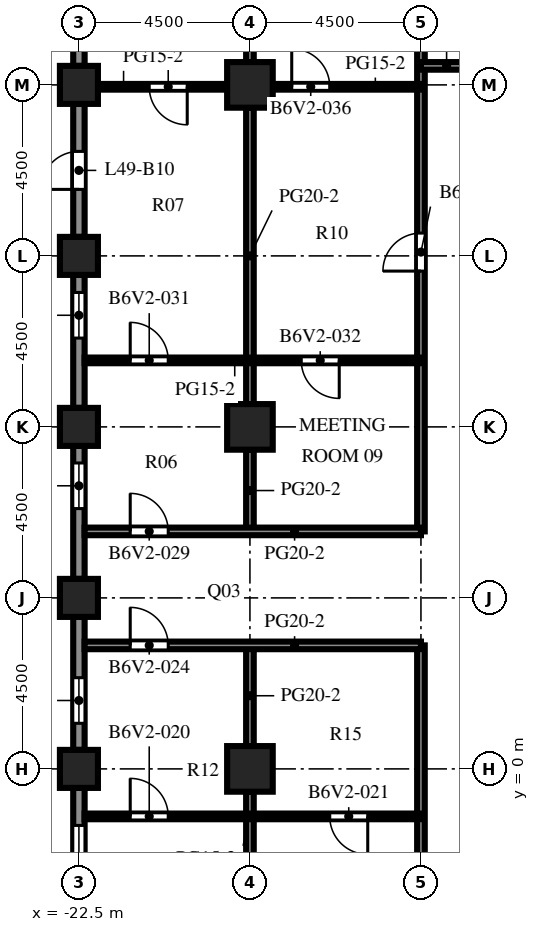
"""IFC4 building model, lengths in metres.
Left out: names, types, materials, properties, quantities, classifications, styles, units other than length and angle.
Written with IfcOpenShell. Run it as: python <this file> out.ifc"""

import sys

from ifc_helpers import new_model, si_unit, direction, frame, frame_2d, origin, origin_2d, place, context, subcontext, project, spatial, rectangle, extrude, element, fill, save


model = new_model("IFC4")
c1 = context("Model", 3, precision=1e-05, world=origin(), true_north=direction((0.0, 1.0)))
c2 = subcontext(c1, "Body", "Model", "MODEL_VIEW")
j1 = project(units=[si_unit("LENGTHUNIT", "METRE"), si_unit("PLANEANGLEUNIT", "RADIAN")], contexts=[c1])
p1 = place(None, origin())
s1 = spatial("IfcSite", under=j1, at=p1, CompositionType="ELEMENT")
p2 = place(p1, origin())
s2 = spatial("IfcBuilding", under=s1, at=p2, CompositionType="ELEMENT")
p3 = place(p2, frame((0.0, 0.0, 216.1)))
s3 = spatial("IfcBuildingStorey", under=s2, at=p3, CompositionType="ELEMENT", Elevation=216.1)
for number, where, z_axis, x_axis in (
    (1, (-22.5, 0.0, 0.0), (0.0, 0.0, 1.0), (1.0, 0.0, 0.0)),
    (2, (-22.5, 4.5, 0.0), (0.0, 0.0, 1.0), (1.0, 0.0, 0.0)),
    (3, (-22.5, 9.0, 0.0), (0.0, 0.0, 1.0), (1.0, 0.0, 0.0)),
    (4, (-22.5, 13.5, 0.0), (0.0, 0.0, 1.0), (1.0, 0.0, 0.0)),
    (5, (-22.5, 18.0, 0.0), (0.0, 0.0, 1.0), (1.0, 0.0, 0.0)),
):
    element("IfcColumn", number, at=place(p3, frame(where, z_axis=z_axis, x_axis=x_axis)), inside=s3, PredefinedType="COLUMN", context=c2, shape_type="SweptSolid", body=[
        extrude(rectangle(XDim=1.0, YDim=1.0, at=origin_2d()), origin(), (0.0, 0.0, 1.0), 4.1),
    ])
for number, where, z_axis, x_axis in (
    (6, (-18.0, 0.0, 0.0), (0.0, 0.0, 1.0), (1.0, 0.0, 0.0)),
    (7, (-18.0, 9.0, 0.0), (0.0, 0.0, 1.0), (1.0, 0.0, 0.0)),
    (8, (-18.0, 18.0, 0.0), (0.0, 0.0, 1.0), (1.0, 0.0, 0.0)),
):
    element("IfcColumn", number, at=place(p3, frame(where, z_axis=z_axis, x_axis=x_axis)), inside=s3, PredefinedType="COLUMN", context=c2, shape_type="SweptSolid", body=[
        extrude(rectangle(XDim=1.2, YDim=1.2, at=origin_2d()), origin(), (0.0, 0.0, 1.0), 4.1),
    ])
p4 = place(p3, frame((-22.5, 18.5, 0.0), z_axis=(0.0, 0.0, 1.0), x_axis=(0.0, 1.0, 0.0)))
e9 = element("IfcWall", 9, at=p4, inside=s3, PredefinedType="SOLIDWALL", context=c2, shape_type="SweptSolid", body=[
    extrude(rectangle(XDim=3.5, YDim=0.3, at=frame_2d((1.75, 0.0))), origin(), (0.0, 0.0, 1.0), 2.7),
])
p5 = place(p4, frame((0.55, 0.0, 0.8)))
e10 = element("IfcOpeningElement", 10, at=p5, cuts=e9, PredefinedType="OPENING", context=c2, shape_type="SweptSolid", body=[
    extrude(rectangle(XDim=2.4, YDim=1.7, at=frame_2d((1.2, 0.85))), frame((0.0, 0.16, 0.0), z_axis=(0.0, -1.0, 0.0), x_axis=(1.0, 0.0, 0.0)), (0.0, 0.0, 1.0), 0.32),
])
p6 = place(p3, frame((-22.5, 14.0, 0.0), z_axis=(0.0, 0.0, 1.0), x_axis=(0.0, 1.0, 0.0)))
e11 = element("IfcWall", 11, at=p6, inside=s3, PredefinedType="SOLIDWALL", context=c2, shape_type="SweptSolid", body=[
    extrude(rectangle(XDim=3.5, YDim=0.3, at=frame_2d((1.75, 0.0))), origin(), (0.0, 0.0, 1.0), 2.7),
])
p7 = place(p6, frame((1.25, 0.0, 0.0)))
e12 = element("IfcOpeningElement", 12, at=p7, cuts=e11, PredefinedType="OPENING", context=c2, shape_type="SweptSolid", body=[
    extrude(rectangle(XDim=1.0, YDim=2.2, at=frame_2d((0.5, 1.1))), frame((0.0, 0.16, 0.0), z_axis=(0.0, -1.0, 0.0), x_axis=(1.0, 0.0, 0.0)), (0.0, 0.0, 1.0), 0.32),
])
p8 = place(p3, frame((-22.5, 9.5, 0.0), z_axis=(0.0, 0.0, 1.0), x_axis=(0.0, 1.0, 0.0)))
e13 = element("IfcWall", 13, at=p8, inside=s3, PredefinedType="SOLIDWALL", context=c2, shape_type="SweptSolid", body=[
    extrude(rectangle(XDim=3.5, YDim=0.3, at=frame_2d((1.75, 0.0))), origin(), (0.0, 0.0, 1.0), 2.7),
])
p9 = place(p8, frame((1.837, 0.0, 0.8)))
e14 = element("IfcOpeningElement", 14, at=p9, cuts=e13, PredefinedType="OPENING", context=c2, shape_type="SweptSolid", body=[
    extrude(rectangle(XDim=1.2, YDim=1.7, at=frame_2d((0.6, 0.85))), frame((0.0, 0.16, 0.0), z_axis=(0.0, -1.0, 0.0), x_axis=(1.0, 0.0, 0.0)), (0.0, 0.0, 1.0), 0.32),
])
p10 = place(p3, frame((-22.5, 5.0, 0.0), z_axis=(0.0, 0.0, 1.0), x_axis=(0.0, 1.0, 0.0)))
e15 = element("IfcWall", 15, at=p10, inside=s3, PredefinedType="SOLIDWALL", context=c2, shape_type="SweptSolid", body=[
    extrude(rectangle(XDim=3.5, YDim=0.3, at=frame_2d((1.75, 0.0))), origin(), (0.0, 0.0, 1.0), 2.7),
])
p11 = place(p10, frame((1.85, 0.0, 0.8)))
e16 = element("IfcOpeningElement", 16, at=p11, cuts=e15, PredefinedType="OPENING", context=c2, shape_type="SweptSolid", body=[
    extrude(rectangle(XDim=1.2, YDim=1.7, at=frame_2d((0.6, 0.85))), frame((0.0, 0.16, 0.0), z_axis=(0.0, -1.0, 0.0), x_axis=(1.0, 0.0, 0.0)), (0.0, 0.0, 1.0), 0.32),
])
p12 = place(p3, frame((-22.5, 0.5, 0.0), z_axis=(0.0, 0.0, 1.0), x_axis=(0.0, 1.0, 0.0)))
e17 = element("IfcWall", 17, at=p12, inside=s3, PredefinedType="SOLIDWALL", context=c2, shape_type="SweptSolid", body=[
    extrude(rectangle(XDim=3.5, YDim=0.3, at=frame_2d((1.75, 0.0))), origin(), (0.0, 0.0, 1.0), 2.7),
])
p13 = place(p12, frame((0.7, 0.0, 0.8)))
e18 = element("IfcOpeningElement", 18, at=p13, cuts=e17, PredefinedType="OPENING", context=c2, shape_type="SweptSolid", body=[
    extrude(rectangle(XDim=1.2, YDim=1.7, at=frame_2d((0.6, 0.85))), frame((0.0, 0.16, 0.0), z_axis=(0.0, -1.0, 0.0), x_axis=(1.0, 0.0, 0.0)), (0.0, 0.0, 1.0), 0.32),
])
p14 = place(p3, frame((-22.5, -4.0, 0.0), z_axis=(0.0, 0.0, 1.0), x_axis=(0.0, 1.0, 0.0)))
e19 = element("IfcWall", 19, at=p14, inside=s3, PredefinedType="SOLIDWALL", context=c2, shape_type="SweptSolid", body=[
    extrude(rectangle(XDim=3.5, YDim=0.3, at=frame_2d((1.75, 0.0))), origin(), (0.0, 0.0, 1.0), 2.7),
])
p15 = place(p14, frame((0.113, 0.0, 0.8)))
e20 = element("IfcOpeningElement", 20, at=p15, cuts=e19, PredefinedType="OPENING", context=c2, shape_type="SweptSolid", body=[
    extrude(rectangle(XDim=2.4, YDim=1.7, at=frame_2d((1.2, 0.85))), frame((0.0, 0.16, 0.0), z_axis=(0.0, -1.0, 0.0), x_axis=(1.0, 0.0, 0.0)), (0.0, 0.0, 1.0), 0.32),
])
p16 = place(p3, frame((-18.0, -8.4, 0.0), z_axis=(0.0, 0.0, 1.0), x_axis=(0.0, 1.0, 0.0)))
e21 = element("IfcWall", 21, at=p16, inside=s3, PredefinedType="PARTITIONING", context=c2, shape_type="SweptSolid", body=[
    extrude(rectangle(XDim=7.8, YDim=0.2, at=frame_2d((3.9, 0.0))), origin(), (0.0, 0.0, 1.0), 3.5),
])
p17 = place(p3, frame((-18.0, 0.6, 0.0), z_axis=(0.0, 0.0, 1.0), x_axis=(0.0, 1.0, 0.0)))
e22 = element("IfcWall", 22, at=p17, inside=s3, PredefinedType="PARTITIONING", context=c2, shape_type="SweptSolid", body=[
    extrude(rectangle(XDim=2.65, YDim=0.2, at=frame_2d((1.325, 0.0))), origin(), (0.0, 0.0, 1.0), 3.5),
])
p18 = place(p3, frame((-18.0, 6.25, 0.0), z_axis=(0.0, 0.0, 1.0), x_axis=(0.0, 1.0, 0.0)))
e23 = element("IfcWall", 23, at=p18, inside=s3, PredefinedType="PARTITIONING", context=c2, shape_type="SweptSolid", body=[
    extrude(rectangle(XDim=2.15, YDim=0.2, at=frame_2d((1.075, 0.0))), origin(), (0.0, 0.0, 1.0), 3.5),
])
p19 = place(p3, frame((-18.0, 9.6, 0.0), z_axis=(0.0, 0.0, 1.0), x_axis=(0.0, 1.0, 0.0)))
e24 = element("IfcWall", 24, at=p19, inside=s3, PredefinedType="PARTITIONING", context=c2, shape_type="SweptSolid", body=[
    extrude(rectangle(XDim=7.8, YDim=0.2, at=frame_2d((3.9, 0.0))), origin(), (0.0, 0.0, 1.0), 3.5),
])
p20 = place(p3, frame((-18.0, 18.6, 0.0), z_axis=(0.0, 0.0, 1.0), x_axis=(0.0, 1.0, 0.0)))
e25 = element("IfcWall", 25, at=p20, inside=s3, PredefinedType="PARTITIONING", context=c2, shape_type="SweptSolid", body=[
    extrude(rectangle(XDim=7.9, YDim=0.2, at=frame_2d((3.95, 0.0))), origin(), (0.0, 0.0, 1.0), 3.5),
])
p21 = place(p3, frame((-13.5, -26.5, 0.0), z_axis=(0.0, 0.0, 1.0), x_axis=(0.0, 1.0, 0.0)))
e26 = element("IfcWall", 26, at=p21, inside=s3, PredefinedType="PARTITIONING", context=c2, shape_type="SweptSolid", body=[
    extrude(rectangle(XDim=29.75, YDim=0.2, at=frame_2d((14.875, 0.0))), origin(), (0.0, 0.0, 1.0), 3.5),
])
p22 = place(p21, frame((20.9, 0.0, 0.0)))
e27 = element("IfcOpeningElement", 27, at=p22, cuts=e26, PredefinedType="OPENING", context=c2, shape_type="SweptSolid", body=[
    extrude(rectangle(XDim=1.0, YDim=2.1, at=frame_2d((0.5, 1.05))), frame((0.0, 0.11, 0.0), z_axis=(0.0, -1.0, 0.0), x_axis=(1.0, 0.0, 0.0)), (0.0, 0.0, 1.0), 0.22),
])
p23 = place(p3, frame((-13.5, 6.25, 0.0), z_axis=(0.0, 0.0, 1.0), x_axis=(0.0, 1.0, 0.0)))
e28 = element("IfcWall", 28, at=p23, inside=s3, PredefinedType="PARTITIONING", context=c2, shape_type="SweptSolid", body=[
    extrude(rectangle(XDim=20.25, YDim=0.2, at=frame_2d((10.125, 0.0))), origin(), (0.0, 0.0, 1.0), 3.5),
])
p24 = place(p23, frame((6.85, 0.0, 0.0)))
e29 = element("IfcOpeningElement", 29, at=p24, cuts=e28, PredefinedType="OPENING", context=c2, shape_type="SweptSolid", body=[
    extrude(rectangle(XDim=1.0, YDim=2.1, at=frame_2d((0.5, 1.05))), frame((0.0, 0.11, 0.0), z_axis=(0.0, -1.0, 0.0), x_axis=(1.0, 0.0, 0.0)), (0.0, 0.0, 1.0), 0.22),
])
p25 = place(p3, frame((-13.5, -1.25, 0.0), z_axis=(0.0, 0.0, 1.0), x_axis=(-1.0, 0.0, 0.0)))
e30 = element("IfcWall", 30, at=p25, inside=s3, PredefinedType="PARTITIONING", context=c2, shape_type="SweptSolid", body=[
    extrude(rectangle(XDim=8.85, YDim=0.15, at=frame_2d((4.425, 0.0))), origin(), (0.0, 0.0, 1.0), 3.5),
])
p26 = place(p25, frame((6.65, 0.0, 0.0)))
e31 = element("IfcOpeningElement", 31, at=p26, cuts=e30, PredefinedType="OPENING", context=c2, shape_type="SweptSolid", body=[
    extrude(rectangle(XDim=1.0, YDim=2.1, at=frame_2d((0.5, 1.05))), frame((0.0, 0.085, 0.0), z_axis=(0.0, -1.0, 0.0), x_axis=(1.0, 0.0, 0.0)), (0.0, 0.0, 1.0), 0.17),
])
p27 = place(p25, frame((1.4, 0.0, 0.0)))
e32 = element("IfcOpeningElement", 32, at=p27, cuts=e30, PredefinedType="OPENING", context=c2, shape_type="SweptSolid", body=[
    extrude(rectangle(XDim=1.0, YDim=2.1, at=frame_2d((0.5, 1.05))), frame((0.0, 0.085, 0.0), z_axis=(0.0, -1.0, 0.0), x_axis=(1.0, 0.0, 0.0)), (0.0, 0.0, 1.0), 0.17),
])
p28 = place(p3, frame((-13.5, 3.25, 0.0), z_axis=(0.0, 0.0, 1.0), x_axis=(-1.0, 0.0, 0.0)))
e33 = element("IfcWall", 33, at=p28, inside=s3, PredefinedType="PARTITIONING", context=c2, shape_type="SweptSolid", body=[
    extrude(rectangle(XDim=8.85, YDim=0.2, at=frame_2d((4.425, 0.0))), origin(), (0.0, 0.0, 1.0), 3.5),
])
p29 = place(p28, frame((6.65, 0.0, 0.0)))
e34 = element("IfcOpeningElement", 34, at=p29, cuts=e33, PredefinedType="OPENING", context=c2, shape_type="SweptSolid", body=[
    extrude(rectangle(XDim=1.0, YDim=2.1, at=frame_2d((0.5, 1.05))), frame((0.0, 0.11, 0.0), z_axis=(0.0, -1.0, 0.0), x_axis=(1.0, 0.0, 0.0)), (0.0, 0.0, 1.0), 0.22),
])
p30 = place(p3, frame((-22.35, 6.25, 0.0), z_axis=(0.0, 0.0, 1.0), x_axis=(1.0, 0.0, 0.0)))
e35 = element("IfcWall", 35, at=p30, inside=s3, PredefinedType="PARTITIONING", context=c2, shape_type="SweptSolid", body=[
    extrude(rectangle(XDim=8.85, YDim=0.2, at=frame_2d((4.425, 0.0))), origin(), (0.0, 0.0, 1.0), 3.5),
])
p31 = place(p30, frame((1.2, 0.0, 0.0)))
e36 = element("IfcOpeningElement", 36, at=p31, cuts=e35, PredefinedType="OPENING", context=c2, shape_type="SweptSolid", body=[
    extrude(rectangle(XDim=1.0, YDim=2.1, at=frame_2d((0.5, 1.05))), frame((0.0, 0.11, 0.0), z_axis=(0.0, -1.0, 0.0), x_axis=(1.0, 0.0, 0.0)), (0.0, 0.0, 1.0), 0.22),
])
p32 = place(p3, frame((-22.35, 10.75, 0.0), z_axis=(0.0, 0.0, 1.0), x_axis=(1.0, 0.0, 0.0)))
e37 = element("IfcWall", 37, at=p32, inside=s3, PredefinedType="PARTITIONING", context=c2, shape_type="SweptSolid", body=[
    extrude(rectangle(XDim=8.85, YDim=0.15, at=frame_2d((4.425, 0.0))), origin(), (0.0, 0.0, 1.0), 3.5),
])
p33 = place(p32, frame((1.2, 0.0, 0.0)))
e38 = element("IfcOpeningElement", 38, at=p33, cuts=e37, PredefinedType="OPENING", context=c2, shape_type="SweptSolid", body=[
    extrude(rectangle(XDim=1.0, YDim=2.1, at=frame_2d((0.5, 1.05))), frame((0.0, 0.085, 0.0), z_axis=(0.0, -1.0, 0.0), x_axis=(1.0, 0.0, 0.0)), (0.0, 0.0, 1.0), 0.17),
])
p34 = place(p32, frame((5.7, 0.0, 0.0)))
e39 = element("IfcOpeningElement", 39, at=p34, cuts=e37, PredefinedType="OPENING", context=c2, shape_type="SweptSolid", body=[
    extrude(rectangle(XDim=1.0, YDim=2.1, at=frame_2d((0.5, 1.05))), frame((0.0, 0.085, 0.0), z_axis=(0.0, -1.0, 0.0), x_axis=(1.0, 0.0, 0.0)), (0.0, 0.0, 1.0), 0.17),
])
p35 = place(p3, frame((-22.0, 17.95, 0.0), z_axis=(0.0, 0.0, 1.0), x_axis=(1.0, 0.0, 0.0)))
e40 = element("IfcWall", 40, at=p35, inside=s3, PredefinedType="PARTITIONING", context=c2, shape_type="SweptSolid", body=[
    extrude(rectangle(XDim=3.4, YDim=0.15, at=frame_2d((1.7, 0.0))), origin(), (0.0, 0.0, 1.0), 3.5),
])
p36 = place(p35, frame((1.35, 0.0, 0.0)))
e41 = element("IfcOpeningElement", 41, at=p36, cuts=e40, PredefinedType="OPENING", context=c2, shape_type="SweptSolid", body=[
    extrude(rectangle(XDim=1.0, YDim=2.1, at=frame_2d((0.5, 1.05))), frame((0.0, 0.085, 0.0), z_axis=(0.0, -1.0, 0.0), x_axis=(1.0, 0.0, 0.0)), (0.0, 0.0, 1.0), 0.17),
])
p37 = place(p3, frame((-17.4, 17.95, 0.0), z_axis=(0.0, 0.0, 1.0), x_axis=(1.0, 0.0, 0.0)))
e42 = element("IfcWall", 42, at=p37, inside=s3, PredefinedType="PARTITIONING", context=c2, shape_type="SweptSolid", body=[
    extrude(rectangle(XDim=3.9, YDim=0.15, at=frame_2d((1.95, 0.0))), origin(), (0.0, 0.0, 1.0), 3.5),
])
p38 = place(p37, frame((0.5, 0.0, 0.0)))
e43 = element("IfcOpeningElement", 43, at=p38, cuts=e42, PredefinedType="OPENING", context=c2, shape_type="SweptSolid", body=[
    extrude(rectangle(XDim=1.0, YDim=2.1, at=frame_2d((0.5, 1.05))), frame((0.0, 0.085, 0.0), z_axis=(0.0, -1.0, 0.0), x_axis=(1.0, 0.0, 0.0)), (0.0, 0.0, 1.0), 0.17),
])
p39 = place(p3, frame((-13.5, 18.5, 0.0), z_axis=(0.0, 0.0, 1.0), x_axis=(1.0, 0.0, 0.0)))
e44 = element("IfcWall", 44, at=p39, inside=s3, PredefinedType="PARTITIONING", context=c2, shape_type="SweptSolid", body=[
    extrude(rectangle(XDim=3.0, YDim=0.2, at=frame_2d((1.5, 0.0))), origin(), (0.0, 0.0, 1.0), 3.5),
])
p40 = place(p39, frame((1.35, 0.0, 0.0)))
e45 = element("IfcOpeningElement", 45, at=p40, cuts=e44, PredefinedType="OPENING", context=c2, shape_type="SweptSolid", body=[
    extrude(rectangle(XDim=1.0, YDim=2.1, at=frame_2d((0.5, 1.05))), frame((0.0, 0.11, 0.0), z_axis=(0.0, -1.0, 0.0), x_axis=(1.0, 0.0, 0.0)), (0.0, 0.0, 1.0), 0.22),
])
p41 = place(p7, origin())
e46 = element("IfcDoor", 46, at=p41, inside=s3, OperationType="SINGLE_SWING_LEFT", PredefinedType="DOOR", context=c2, shape_type="SweptSolid", body=[
    extrude(rectangle(XDim=1.0, YDim=2.2, at=frame_2d((0.5, 1.1))), frame((0.0, 0.025, 0.0), z_axis=(0.0, -1.0, 0.0), x_axis=(1.0, 0.0, 0.0)), (0.0, 0.0, 1.0), 0.05),
])
fill(e12, e46)
p42 = place(p9, origin())
e47 = element("IfcWindow", 47, at=p42, inside=s3, PartitioningType="SINGLE_PANEL", PredefinedType="WINDOW", context=c2, shape_type="SweptSolid", body=[
    extrude(rectangle(XDim=1.2, YDim=1.7, at=frame_2d((0.6, 0.85))), frame((0.0, 0.03, 0.0), z_axis=(0.0, -1.0, 0.0), x_axis=(1.0, 0.0, 0.0)), (0.0, 0.0, 1.0), 0.06),
])
fill(e14, e47)
p43 = place(p11, origin())
e48 = element("IfcWindow", 48, at=p43, inside=s3, PartitioningType="SINGLE_PANEL", PredefinedType="WINDOW", context=c2, shape_type="SweptSolid", body=[
    extrude(rectangle(XDim=1.2, YDim=1.7, at=frame_2d((0.6, 0.85))), frame((0.0, 0.03, 0.0), z_axis=(0.0, -1.0, 0.0), x_axis=(1.0, 0.0, 0.0)), (0.0, 0.0, 1.0), 0.06),
])
fill(e16, e48)
p44 = place(p13, origin())
e49 = element("IfcWindow", 49, at=p44, inside=s3, PartitioningType="SINGLE_PANEL", PredefinedType="WINDOW", context=c2, shape_type="SweptSolid", body=[
    extrude(rectangle(XDim=1.2, YDim=1.7, at=frame_2d((0.6, 0.85))), frame((0.0, 0.03, 0.0), z_axis=(0.0, -1.0, 0.0), x_axis=(1.0, 0.0, 0.0)), (0.0, 0.0, 1.0), 0.06),
])
fill(e18, e49)
p45 = place(p15, origin())
e50 = element("IfcWindow", 50, at=p45, inside=s3, PartitioningType="SINGLE_PANEL", PredefinedType="WINDOW", context=c2, shape_type="SweptSolid", body=[
    extrude(rectangle(XDim=2.4, YDim=1.7, at=frame_2d((1.2, 0.85))), frame((0.0, 0.03, 0.0), z_axis=(0.0, -1.0, 0.0), x_axis=(1.0, 0.0, 0.0)), (0.0, 0.0, 1.0), 0.06),
])
fill(e20, e50)
p46 = place(p24, origin())
e51 = element("IfcDoor", 51, at=p46, inside=s3, OperationType="SINGLE_SWING_LEFT", PredefinedType="DOOR", context=c2, shape_type="SweptSolid", body=[
    extrude(rectangle(XDim=1.0, YDim=2.1, at=frame_2d((0.5, 1.05))), frame((0.0, 0.025, 0.0), z_axis=(0.0, -1.0, 0.0), x_axis=(1.0, 0.0, 0.0)), (0.0, 0.0, 1.0), 0.05),
])
fill(e29, e51)
p47 = place(p26, origin())
e52 = element("IfcDoor", 52, at=p47, inside=s3, OperationType="SINGLE_SWING_RIGHT", PredefinedType="DOOR", context=c2, shape_type="SweptSolid", body=[
    extrude(rectangle(XDim=1.0, YDim=2.1, at=frame_2d((0.5, 1.05))), frame((0.0, 0.025, 0.0), z_axis=(0.0, -1.0, 0.0), x_axis=(1.0, 0.0, 0.0)), (0.0, 0.0, 1.0), 0.05),
])
fill(e31, e52)
p48 = place(p27, origin())
e53 = element("IfcDoor", 53, at=p48, inside=s3, OperationType="SINGLE_SWING_LEFT", PredefinedType="DOOR", context=c2, shape_type="SweptSolid", body=[
    extrude(rectangle(XDim=1.0, YDim=2.1, at=frame_2d((0.5, 1.05))), frame((0.0, 0.025, 0.0), z_axis=(0.0, -1.0, 0.0), x_axis=(1.0, 0.0, 0.0)), (0.0, 0.0, 1.0), 0.05),
])
fill(e32, e53)
p49 = place(p29, origin())
e54 = element("IfcDoor", 54, at=p49, inside=s3, OperationType="SINGLE_SWING_RIGHT", PredefinedType="DOOR", context=c2, shape_type="SweptSolid", body=[
    extrude(rectangle(XDim=1.0, YDim=2.1, at=frame_2d((0.5, 1.05))), frame((0.0, 0.025, 0.0), z_axis=(0.0, -1.0, 0.0), x_axis=(1.0, 0.0, 0.0)), (0.0, 0.0, 1.0), 0.05),
])
fill(e34, e54)
p50 = place(p31, origin())
e55 = element("IfcDoor", 55, at=p50, inside=s3, OperationType="SINGLE_SWING_LEFT", PredefinedType="DOOR", context=c2, shape_type="SweptSolid", body=[
    extrude(rectangle(XDim=1.0, YDim=2.1, at=frame_2d((0.5, 1.05))), frame((0.0, 0.025, 0.0), z_axis=(0.0, -1.0, 0.0), x_axis=(1.0, 0.0, 0.0)), (0.0, 0.0, 1.0), 0.05),
])
fill(e36, e55)
p51 = place(p33, origin())
e56 = element("IfcDoor", 56, at=p51, inside=s3, OperationType="SINGLE_SWING_LEFT", PredefinedType="DOOR", context=c2, shape_type="SweptSolid", body=[
    extrude(rectangle(XDim=1.0, YDim=2.1, at=frame_2d((0.5, 1.05))), frame((0.0, 0.025, 0.0), z_axis=(0.0, -1.0, 0.0), x_axis=(1.0, 0.0, 0.0)), (0.0, 0.0, 1.0), 0.05),
])
fill(e38, e56)
p52 = place(p34, origin())
e57 = element("IfcDoor", 57, at=p52, inside=s3, OperationType="SINGLE_SWING_RIGHT", PredefinedType="DOOR", context=c2, shape_type="SweptSolid", body=[
    extrude(rectangle(XDim=1.0, YDim=2.1, at=frame_2d((0.5, 1.05))), frame((0.0, 0.025, 0.0), z_axis=(0.0, -1.0, 0.0), x_axis=(1.0, 0.0, 0.0)), (0.0, 0.0, 1.0), 0.05),
])
fill(e39, e57)
p53 = place(p36, origin())
e58 = element("IfcDoor", 58, at=p53, inside=s3, OperationType="SINGLE_SWING_RIGHT", PredefinedType="DOOR", context=c2, shape_type="SweptSolid", body=[
    extrude(rectangle(XDim=1.0, YDim=2.1, at=frame_2d((0.5, 1.05))), frame((0.0, 0.025, 0.0), z_axis=(0.0, -1.0, 0.0), x_axis=(1.0, 0.0, 0.0)), (0.0, 0.0, 1.0), 0.05),
])
fill(e41, e58)
p54 = place(p38, origin())
e59 = element("IfcDoor", 59, at=p54, inside=s3, OperationType="SINGLE_SWING_LEFT", PredefinedType="DOOR", context=c2, shape_type="SweptSolid", body=[
    extrude(rectangle(XDim=1.0, YDim=2.1, at=frame_2d((0.5, 1.05))), frame((0.0, 0.025, 0.0), z_axis=(0.0, -1.0, 0.0), x_axis=(1.0, 0.0, 0.0)), (0.0, 0.0, 1.0), 0.05),
])
fill(e43, e59)
save(model, sys.argv[1])
